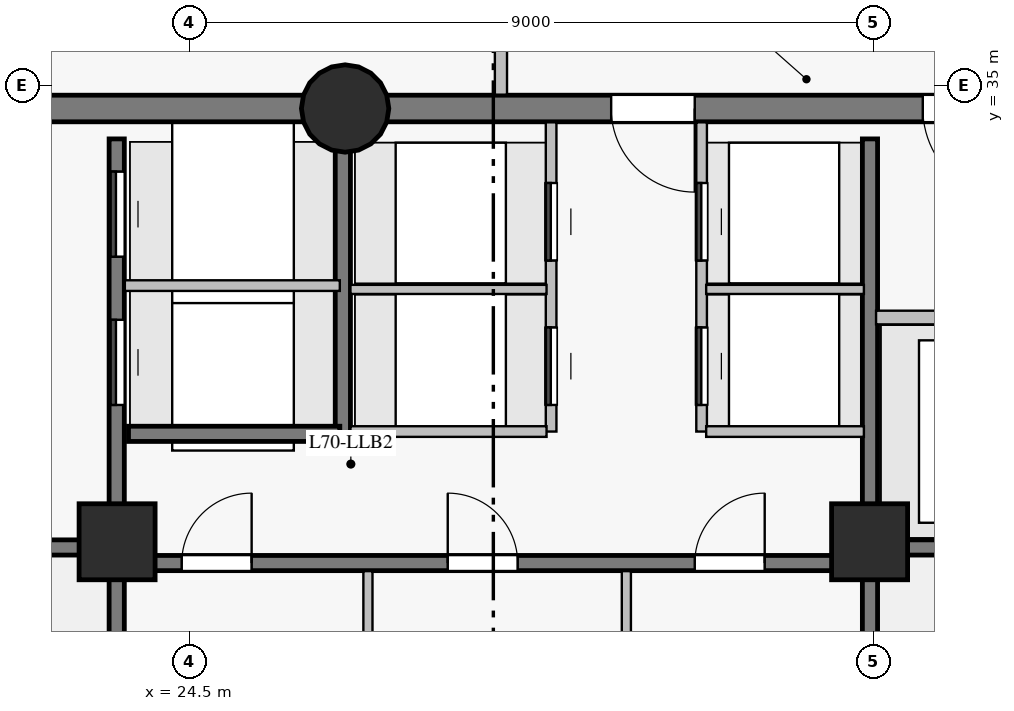
"""IFC4 building model, lengths in metres.
Left out: names, types, materials, properties, quantities, classifications, styles, units other than length and angle.
Written with IfcOpenShell. Run it as: python <this file> out.ifc"""

import sys

from ifc_helpers import new_model, si_unit, direction, frame, frame_2d, origin, origin_with_axes, origin_2d, place, context, subcontext, project, spatial, rectangle, circle, extrude, source, transform, mapped, element, fill, save


model = new_model("IFC4")
c1 = context("Model", 3, precision=1e-05, world=origin(), true_north=direction((0.0, 1.0)))
c2 = subcontext(c1, "Body", "Model", "MODEL_VIEW")
j1 = project(units=[si_unit("LENGTHUNIT", "METRE"), si_unit("PLANEANGLEUNIT", "RADIAN")], contexts=[c1])
p1 = place(None, origin())
s1 = spatial("IfcSite", under=j1, at=p1, CompositionType="ELEMENT")
p2 = place(p1, origin())
s2 = spatial("IfcBuilding", under=s1, at=p2, CompositionType="ELEMENT")
p3 = place(p2, frame((0.0, 0.0, 238.25)))
s3 = spatial("IfcBuildingStorey", under=s2, at=p3, CompositionType="ELEMENT", Elevation=238.25)
p4 = place(p3, frame((37.5, 34.7, 0.0), z_axis=(0.0, 0.0, 1.0), x_axis=(-1.0, 0.0, 0.0)))
e1 = element("IfcWall", 1, at=p4, inside=s3, PredefinedType="SHEAR", context=c2, shape_type="SweptSolid", body=[
    extrude(rectangle(XDim=10.95, YDim=0.35, at=frame_2d((5.475, 0.0))), origin(), (0.0, 0.0, 1.0), 2.85),
])
p5 = place(p4, frame((2.15, 0.0, 0.0)))
e2 = element("IfcOpeningElement", 2, at=p5, cuts=e1, PredefinedType="OPENING", context=c2, shape_type="SweptSolid", body=[
    extrude(rectangle(XDim=1.2, YDim=2.15, at=frame_2d((0.6, 1.075))), frame((0.0, 0.185, 0.0), z_axis=(0.0, -1.0, 0.0), x_axis=(1.0, 0.0, 0.0)), (0.0, 0.0, 1.0), 0.37),
])
p6 = place(p4, frame((6.35, 0.0, 0.0)))
e3 = element("IfcOpeningElement", 3, at=p6, cuts=e1, PredefinedType="OPENING", context=c2, shape_type="SweptSolid", body=[
    extrude(rectangle(XDim=1.1, YDim=2.15, at=frame_2d((0.55, 1.075))), frame((0.0, 0.185, 0.0), z_axis=(0.0, -1.0, 0.0), x_axis=(1.0, 0.0, 0.0)), (0.0, 0.0, 1.0), 0.37),
])
p7 = place(p3, frame((26.55, 34.7, 0.0), z_axis=(0.0, 0.0, 1.0), x_axis=(-1.0, 0.0, 0.0)))
e4 = element("IfcWall", 4, at=p7, inside=s3, PredefinedType="SHEAR", context=c2, shape_type="SweptSolid", body=[
    extrude(rectangle(XDim=7.05, YDim=0.35, at=frame_2d((3.525, 0.0))), origin(), (0.0, 0.0, 1.0), 2.85),
])
m1 = source(origin_with_axes(), c2, "Body", "SweptSolid", [
    extrude(circle(Radius=0.575, at=origin_2d()), origin(), (0.0, 0.0, 1.0), 3.05),
])
p8 = place(p3, frame((26.55, 34.7, 0.0), z_axis=(0.0, 0.0, 1.0), x_axis=(1.0, 0.0, 0.0)))
e5 = element("IfcColumn", 5, at=p8, inside=s3, PredefinedType="COLUMN", context=c2, shape_type="MappedRepresentation", body=[
    mapped(m1, transform((0.0, 0.0, 0.0), scale=1.0)),
])
m2 = source(origin_with_axes(), c2, "Body", "SweptSolid", [
    extrude(rectangle(XDim=1.0, YDim=1.0, at=origin_2d()), origin(), (0.0, 0.0, 1.0), 3.05),
])
for number, where, z_axis, x_axis in (
    (6, (23.55, 29.0, 0.0), (0.0, 0.0, 1.0), (1.0, 0.0, 0.0)),
    (7, (33.45, 29.0, 0.0), (0.0, 0.0, 1.0), (1.0, 0.0, 0.0)),
):
    element("IfcColumn", number, at=place(p3, frame(where, z_axis=z_axis, x_axis=x_axis)), inside=s3, PredefinedType="COLUMN", context=c2, shape_type="MappedRepresentation", body=[
        mapped(m2, transform((0.0, 0.0, 0.0), scale=1.0)),
    ])
p9 = place(p3, frame((23.545, 18.7, 0.0), z_axis=(0.0, 0.0, 1.0), x_axis=(0.0, 1.0, 0.0)))
e8 = element("IfcWall", 8, at=p9, inside=s3, PredefinedType="SHEAR", context=c2, shape_type="SweptSolid", body=[
    extrude(rectangle(XDim=15.6, YDim=0.2, at=frame_2d((7.8, 0.0))), origin(), (0.0, 0.0, 1.0), 2.85),
])
p10 = place(p9, frame((2.75, 0.0, 0.0)))
e9 = element("IfcOpeningElement", 9, at=p10, cuts=e8, PredefinedType="OPENING", context=c2, shape_type="SweptSolid", body=[
    extrude(rectangle(XDim=1.15, YDim=2.15, at=frame_2d((0.575, 1.075))), frame((0.0, 0.11, 0.0), z_axis=(0.0, -1.0, 0.0), x_axis=(1.0, 0.0, 0.0)), (0.0, 0.0, 1.0), 0.22),
])
p11 = place(p9, frame((0.14, 0.0, 0.0)))
e10 = element("IfcOpeningElement", 10, at=p11, cuts=e8, PredefinedType="OPENING", context=c2, shape_type="SweptSolid", body=[
    extrude(rectangle(XDim=0.88, YDim=2.1, at=frame_2d((0.44, 1.05))), frame((0.0, 0.11, 0.0), z_axis=(0.0, -1.0, 0.0), x_axis=(1.0, 0.0, 0.0)), (0.0, 0.0, 1.0), 0.22),
])
p12 = place(p9, frame((1.36, 0.0, 0.0)))
e11 = element("IfcOpeningElement", 11, at=p12, cuts=e8, PredefinedType="OPENING", context=c2, shape_type="SweptSolid", body=[
    extrude(rectangle(XDim=0.88, YDim=2.1, at=frame_2d((0.44, 1.05))), frame((0.0, 0.11, 0.0), z_axis=(0.0, -1.0, 0.0), x_axis=(1.0, 0.0, 0.0)), (0.0, 0.0, 1.0), 0.22),
])
p13 = place(p9, frame((12.1, 0.0, 0.0)))
e12 = element("IfcOpeningElement", 12, at=p13, cuts=e8, PredefinedType="OPENING", context=c2, shape_type="SweptSolid", body=[
    extrude(rectangle(XDim=1.12, YDim=2.15, at=frame_2d((0.56, 1.075))), frame((0.0, 0.11, 0.0), z_axis=(0.0, -1.0, 0.0), x_axis=(1.0, 0.0, 0.0)), (0.0, 0.0, 1.0), 0.22),
])
p14 = place(p9, frame((14.05, 0.0, 0.0)))
e13 = element("IfcOpeningElement", 13, at=p14, cuts=e8, PredefinedType="OPENING", context=c2, shape_type="SweptSolid", body=[
    extrude(rectangle(XDim=1.12, YDim=2.15, at=frame_2d((0.56, 1.075))), frame((0.0, 0.11, 0.0), z_axis=(0.0, -1.0, 0.0), x_axis=(1.0, 0.0, 0.0)), (0.0, 0.0, 1.0), 0.22),
])
p15 = place(p3, frame((33.455, 18.7, 0.0), z_axis=(0.0, 0.0, 1.0), x_axis=(0.0, 1.0, 0.0)))
e14 = element("IfcWall", 14, at=p15, inside=s3, PredefinedType="SHEAR", context=c2, shape_type="SweptSolid", body=[
    extrude(rectangle(XDim=15.6, YDim=0.2, at=frame_2d((7.8, 0.0))), origin(), (0.0, 0.0, 1.0), 2.85),
])
p16 = place(p15, frame((2.75, 0.0, 0.0)))
e15 = element("IfcOpeningElement", 15, at=p16, cuts=e14, PredefinedType="OPENING", context=c2, shape_type="SweptSolid", body=[
    extrude(rectangle(XDim=1.15, YDim=2.15, at=frame_2d((0.575, 1.075))), frame((0.0, 0.11, 0.0), z_axis=(0.0, -1.0, 0.0), x_axis=(1.0, 0.0, 0.0)), (0.0, 0.0, 1.0), 0.22),
])
p17 = place(p15, frame((0.55, 0.0, 0.0)))
e16 = element("IfcOpeningElement", 16, at=p17, cuts=e14, PredefinedType="OPENING", context=c2, shape_type="SweptSolid", body=[
    extrude(rectangle(XDim=0.94, YDim=2.1, at=frame_2d((0.47, 1.05))), frame((0.0, 0.11, 0.0), z_axis=(0.0, -1.0, 0.0), x_axis=(1.0, 0.0, 0.0)), (0.0, 0.0, 1.0), 0.22),
])
p18 = place(p3, frame((23.7, 28.72, 0.0), z_axis=(0.0, 0.0, 1.0), x_axis=(1.0, 0.0, 0.0)))
e17 = element("IfcWall", 17, at=p18, inside=s3, PredefinedType="SHEAR", context=c2, shape_type="SweptSolid", body=[
    extrude(rectangle(XDim=9.6, YDim=0.2, at=frame_2d((4.8, 0.0))), origin(), (0.0, 0.0, 1.0), 2.85),
])
p19 = place(p18, frame((0.7, 0.0, 0.0)))
e18 = element("IfcOpeningElement", 18, at=p19, cuts=e17, PredefinedType="OPENING", context=c2, shape_type="SweptSolid", body=[
    extrude(rectangle(XDim=0.92, YDim=2.1, at=frame_2d((0.46, 1.05))), frame((0.0, 0.11, 0.0), z_axis=(0.0, -1.0, 0.0), x_axis=(1.0, 0.0, 0.0)), (0.0, 0.0, 1.0), 0.22),
])
p20 = place(p18, frame((4.2, 0.0, 0.0)))
e19 = element("IfcOpeningElement", 19, at=p20, cuts=e17, PredefinedType="OPENING", context=c2, shape_type="SweptSolid", body=[
    extrude(rectangle(XDim=0.92, YDim=2.1, at=frame_2d((0.46, 1.05))), frame((0.0, 0.11, 0.0), z_axis=(0.0, -1.0, 0.0), x_axis=(1.0, 0.0, 0.0)), (0.0, 0.0, 1.0), 0.22),
])
p21 = place(p18, frame((7.45, 0.0, 0.0)))
e20 = element("IfcOpeningElement", 20, at=p21, cuts=e17, PredefinedType="OPENING", context=c2, shape_type="SweptSolid", body=[
    extrude(rectangle(XDim=0.92, YDim=2.1, at=frame_2d((0.46, 1.05))), frame((0.0, 0.11, 0.0), z_axis=(0.0, -1.0, 0.0), x_axis=(1.0, 0.0, 0.0)), (0.0, 0.0, 1.0), 0.22),
])
for number, where, z_axis, x_axis in (
    (21, (33.455, 28.925, 0.0), (0.0, 0.0, 1.0), (1.0, 0.0, 0.0)),
    (22, (19.55, 28.925, 0.0), (0.0, 0.0, 1.0), (1.0, 0.0, 0.0)),
):
    element("IfcWall", number, at=place(p3, frame(where, z_axis=z_axis, x_axis=x_axis)), inside=s3, PredefinedType="SHEAR", context=c2, shape_type="SweptSolid", body=[
        extrude(rectangle(XDim=3.995, YDim=0.2, at=frame_2d((1.998, 0.0))), origin(), (0.0, 0.0, 1.0), 2.85),
    ])
p22 = place(p3, frame((26.52, 30.42, 0.0), z_axis=(0.0, 0.0, 1.0), x_axis=(0.0, 1.0, 0.0)))
e23 = element("IfcWall", 23, at=p22, inside=s3, PredefinedType="SHEAR", context=c2, shape_type="SweptSolid", body=[
    extrude(rectangle(XDim=3.86, YDim=0.2, at=frame_2d((1.93, 0.0))), origin(), (0.0, 0.0, 1.0), 2.85),
])
p23 = place(p3, frame((23.7, 30.42, 0.0), z_axis=(0.0, 0.0, 1.0), x_axis=(1.0, 0.0, 0.0)))
e24 = element("IfcWall", 24, at=p23, inside=s3, PredefinedType="SHEAR", context=c2, shape_type="SweptSolid", body=[
    extrude(rectangle(XDim=2.78, YDim=0.2, at=frame_2d((1.39, 0.0))), origin(), (0.0, 0.0, 1.0), 2.85),
])
p24 = place(p3, frame((29.26, 30.45, 0.0), z_axis=(0.0, 0.0, 1.0), x_axis=(0.0, 1.0, 0.0)))
e25 = element("IfcWall", 25, at=p24, inside=s3, PredefinedType="PARTITIONING", context=c2, shape_type="SweptSolid", body=[
    extrude(rectangle(XDim=4.068, YDim=0.14, at=frame_2d((2.034, 0.0))), origin(), (0.0, 0.0, 1.0), 2.85),
])
p25 = place(p24, frame((0.35, 0.0, 0.0)))
e26 = element("IfcOpeningElement", 26, at=p25, cuts=e25, PredefinedType="OPENING", context=c2, shape_type="SweptSolid", body=[
    extrude(rectangle(XDim=1.02, YDim=2.15, at=frame_2d((0.51, 1.075))), frame((0.0, 0.08, 0.0), z_axis=(0.0, -1.0, 0.0), x_axis=(1.0, 0.0, 0.0)), (0.0, 0.0, 1.0), 0.16),
])
p26 = place(p24, frame((2.25, 0.0, 0.0)))
e27 = element("IfcOpeningElement", 27, at=p26, cuts=e25, PredefinedType="OPENING", context=c2, shape_type="SweptSolid", body=[
    extrude(rectangle(XDim=1.02, YDim=2.15, at=frame_2d((0.51, 1.075))), frame((0.0, 0.08, 0.0), z_axis=(0.0, -1.0, 0.0), x_axis=(1.0, 0.0, 0.0)), (0.0, 0.0, 1.0), 0.16),
])
p27 = place(p3, frame((31.24, 30.45, 0.0), z_axis=(0.0, 0.0, 1.0), x_axis=(0.0, 1.0, 0.0)))
e28 = element("IfcWall", 28, at=p27, inside=s3, PredefinedType="PARTITIONING", context=c2, shape_type="SweptSolid", body=[
    extrude(rectangle(XDim=4.068, YDim=0.14, at=frame_2d((2.034, 0.0))), origin(), (0.0, 0.0, 1.0), 2.85),
])
p28 = place(p27, frame((0.35, 0.0, 0.0)))
e29 = element("IfcOpeningElement", 29, at=p28, cuts=e28, PredefinedType="OPENING", context=c2, shape_type="SweptSolid", body=[
    extrude(rectangle(XDim=1.02, YDim=2.15, at=frame_2d((0.51, 1.075))), frame((0.0, 0.08, 0.0), z_axis=(0.0, -1.0, 0.0), x_axis=(1.0, 0.0, 0.0)), (0.0, 0.0, 1.0), 0.16),
])
p29 = place(p27, frame((2.25, 0.0, 0.0)))
e30 = element("IfcOpeningElement", 30, at=p29, cuts=e28, PredefinedType="OPENING", context=c2, shape_type="SweptSolid", body=[
    extrude(rectangle(XDim=1.02, YDim=2.15, at=frame_2d((0.51, 1.075))), frame((0.0, 0.08, 0.0), z_axis=(0.0, -1.0, 0.0), x_axis=(1.0, 0.0, 0.0)), (0.0, 0.0, 1.0), 0.16),
])
p30 = place(p3, frame((33.535, 31.95, 0.0), z_axis=(0.0, 0.0, 1.0), x_axis=(1.0, 0.0, 0.0)))
e31 = element("IfcWall", 31, at=p30, inside=s3, PredefinedType="PARTITIONING", context=c2, shape_type="SweptSolid", body=[
    extrude(rectangle(XDim=3.784, YDim=0.18, at=frame_2d((1.892, 0.0))), origin(), (0.0, 0.0, 1.0), 2.85),
])
p31 = place(p30, frame((0.9, 0.0, 0.0)))
e32 = element("IfcOpeningElement", 32, at=p31, cuts=e31, PredefinedType="OPENING", context=c2, shape_type="SweptSolid", body=[
    extrude(rectangle(XDim=1.3, YDim=2.2, at=frame_2d((0.65, 1.1))), frame((0.0, 0.1, 0.0), z_axis=(0.0, -1.0, 0.0), x_axis=(1.0, 0.0, 0.0)), (0.0, 0.0, 1.0), 0.2),
])
p32 = place(p3, frame((23.652, 32.37, 0.0), z_axis=(0.0, 0.0, 1.0), x_axis=(1.0, 0.0, 0.0)))
e33 = element("IfcWall", 33, at=p32, inside=s3, PredefinedType="PARTITIONING", context=c2, shape_type="SweptSolid", body=[
    extrude(rectangle(XDim=2.828, YDim=0.14, at=frame_2d((1.414, 0.0))), origin(), (0.0, 0.0, 1.0), 2.85),
])
p33 = place(p3, frame((26.62, 30.45, 0.0), z_axis=(0.0, 0.0, 1.0), x_axis=(1.0, 0.0, 0.0)))
e34 = element("IfcWall", 34, at=p33, inside=s3, PredefinedType="PARTITIONING", context=c2, shape_type="SweptSolid", body=[
    extrude(rectangle(XDim=2.58, YDim=0.14, at=frame_2d((1.29, 0.0))), origin(), (0.0, 0.0, 1.0), 2.85),
])
p34 = place(p3, frame((26.62, 32.32, 0.0), z_axis=(0.0, 0.0, 1.0), x_axis=(1.0, 0.0, 0.0)))
e35 = element("IfcWall", 35, at=p34, inside=s3, PredefinedType="PARTITIONING", context=c2, shape_type="SweptSolid", body=[
    extrude(rectangle(XDim=2.58, YDim=0.12, at=frame_2d((1.29, 0.0))), origin(), (0.0, 0.0, 1.0), 2.85),
])
for number, where, z_axis, x_axis in (
    (36, (26.85, 26.027, 0.0), (0.0, 0.0, 1.0), (0.0, 1.0, 0.0)),
    (37, (30.25, 26.027, 0.0), (0.0, 0.0, 1.0), (0.0, 1.0, 0.0)),
):
    element("IfcWall", number, at=place(p3, frame(where, z_axis=z_axis, x_axis=x_axis)), inside=s3, PredefinedType="PARTITIONING", context=c2, shape_type="SweptSolid", body=[
        extrude(rectangle(XDim=2.587, YDim=0.12, at=frame_2d((1.293, 0.0))), origin(), (0.0, 0.0, 1.0), 2.85),
    ])
p35 = place(p3, frame((31.3, 30.45, 0.0), z_axis=(0.0, 0.0, 1.0), x_axis=(1.0, 0.0, 0.0)))
e38 = element("IfcWall", 38, at=p35, inside=s3, PredefinedType="PARTITIONING", context=c2, shape_type="SweptSolid", body=[
    extrude(rectangle(XDim=2.075, YDim=0.14, at=frame_2d((1.038, 0.0))), origin(), (0.0, 0.0, 1.0), 2.85),
])
p36 = place(p3, frame((31.3, 32.32, 0.0), z_axis=(0.0, 0.0, 1.0), x_axis=(1.0, 0.0, 0.0)))
e39 = element("IfcWall", 39, at=p36, inside=s3, PredefinedType="PARTITIONING", context=c2, shape_type="SweptSolid", body=[
    extrude(rectangle(XDim=2.075, YDim=0.12, at=frame_2d((1.038, 0.0))), origin(), (0.0, 0.0, 1.0), 2.85),
])
p37 = place(p3, frame((28.6, 34.882, 0.0), z_axis=(0.0, 0.0, 1.0), x_axis=(0.0, 1.0, 0.0)))
e40 = element("IfcWall", 40, at=p37, inside=s3, PredefinedType="PARTITIONING", context=c2, shape_type="SweptSolid", body=[
    extrude(rectangle(XDim=1.518, YDim=0.16, at=frame_2d((0.759, 0.0))), origin(), (0.0, 0.0, 1.0), 2.85),
])
m3 = source(origin_with_axes(), c2, "Body", "SweptSolid", [
    extrude(rectangle(XDim=1.2, YDim=2.15, at=frame_2d((0.6, 1.075))), frame((0.0, 0.025, 0.0), z_axis=(0.0, -1.0, 0.0), x_axis=(1.0, 0.0, 0.0)), (0.0, 0.0, 1.0), 0.05),
])
p38 = place(p5, origin())
e41 = element("IfcDoor", 41, at=p38, inside=s3, OperationType="SINGLE_SWING_LEFT", PredefinedType="DOOR", context=c2, shape_type="MappedRepresentation", body=[
    mapped(m3, transform((0.0, 0.0, 0.0), scale=1.0)),
])
fill(e2, e41)
m4 = source(origin_with_axes(), c2, "Body", "SweptSolid", [
    extrude(rectangle(XDim=0.92, YDim=2.1, at=frame_2d((0.46, 1.05))), frame((0.0, 0.025, 0.0), z_axis=(0.0, -1.0, 0.0), x_axis=(1.0, 0.0, 0.0)), (0.0, 0.0, 1.0), 0.05),
])
p39 = place(p19, origin())
e42 = element("IfcDoor", 42, at=p39, inside=s3, OperationType="SINGLE_SWING_RIGHT", PredefinedType="DOOR", context=c2, shape_type="MappedRepresentation", body=[
    mapped(m4, transform((0.0, 0.0, 0.0), scale=1.0)),
])
fill(e18, e42)
p40 = place(p20, origin())
e43 = element("IfcDoor", 43, at=p40, inside=s3, OperationType="SINGLE_SWING_LEFT", PredefinedType="DOOR", context=c2, shape_type="MappedRepresentation", body=[
    mapped(m4, transform((0.0, 0.0, 0.0), scale=1.0)),
])
fill(e19, e43)
p41 = place(p21, origin())
e44 = element("IfcDoor", 44, at=p41, inside=s3, OperationType="SINGLE_SWING_RIGHT", PredefinedType="DOOR", context=c2, shape_type="MappedRepresentation", body=[
    mapped(m4, transform((0.0, 0.0, 0.0), scale=1.0)),
])
fill(e20, e44)
m5 = source(origin_with_axes(), c2, "Body", "SweptSolid", [
    extrude(rectangle(XDim=1.1, YDim=2.15, at=frame_2d((0.55, 1.075))), frame((0.0, 0.025, 0.0), z_axis=(0.0, -1.0, 0.0), x_axis=(1.0, 0.0, 0.0)), (0.0, 0.0, 1.0), 0.05),
])
p42 = place(p6, origin())
e45 = element("IfcDoor", 45, at=p42, inside=s3, OperationType="SINGLE_SWING_LEFT", PredefinedType="DOOR", context=c2, shape_type="MappedRepresentation", body=[
    mapped(m5, transform((0.0, 0.0, 0.0), scale=1.0)),
])
fill(e3, e45)
m6 = source(origin_with_axes(), c2, "Body", "SweptSolid", [
    extrude(rectangle(XDim=1.12, YDim=2.15, at=frame_2d((0.56, 1.075))), frame((0.0, 0.025, 0.0), z_axis=(0.0, -1.0, 0.0), x_axis=(1.0, 0.0, 0.0)), (0.0, 0.0, 1.0), 0.05),
])
p43 = place(p13, origin())
e46 = element("IfcDoor", 46, at=p43, inside=s3, OperationType="SLIDING_TO_LEFT", PredefinedType="DOOR", context=c2, shape_type="MappedRepresentation", body=[
    mapped(m6, transform((0.0, 0.0, 0.0), scale=1.0)),
])
fill(e12, e46)
p44 = place(p14, origin())
e47 = element("IfcDoor", 47, at=p44, inside=s3, OperationType="SLIDING_TO_RIGHT", PredefinedType="DOOR", context=c2, shape_type="MappedRepresentation", body=[
    mapped(m6, transform((0.0, 0.0, 0.0), scale=1.0)),
])
fill(e13, e47)
m7 = source(origin_with_axes(), c2, "Body", "SweptSolid", [
    extrude(rectangle(XDim=1.02, YDim=2.15, at=frame_2d((0.51, 1.075))), frame((0.0, 0.025, 0.0), z_axis=(0.0, -1.0, 0.0), x_axis=(1.0, 0.0, 0.0)), (0.0, 0.0, 1.0), 0.05),
])
p45 = place(p25, origin())
e48 = element("IfcDoor", 48, at=p45, inside=s3, OperationType="SLIDING_TO_LEFT", PredefinedType="DOOR", context=c2, shape_type="MappedRepresentation", body=[
    mapped(m7, transform((0.0, 0.0, 0.0), scale=1.0)),
])
fill(e26, e48)
p46 = place(p26, origin())
e49 = element("IfcDoor", 49, at=p46, inside=s3, OperationType="SLIDING_TO_LEFT", PredefinedType="DOOR", context=c2, shape_type="MappedRepresentation", body=[
    mapped(m7, transform((0.0, 0.0, 0.0), scale=1.0)),
])
fill(e27, e49)
p47 = place(p28, origin())
e50 = element("IfcDoor", 50, at=p47, inside=s3, OperationType="SLIDING_TO_LEFT", PredefinedType="DOOR", context=c2, shape_type="MappedRepresentation", body=[
    mapped(m7, transform((0.0, 0.0, 0.0), scale=1.0)),
])
fill(e29, e50)
p48 = place(p29, origin())
e51 = element("IfcDoor", 51, at=p48, inside=s3, OperationType="SLIDING_TO_LEFT", PredefinedType="DOOR", context=c2, shape_type="MappedRepresentation", body=[
    mapped(m7, transform((0.0, 0.0, 0.0), scale=1.0)),
])
fill(e30, e51)
save(model, sys.argv[1])
